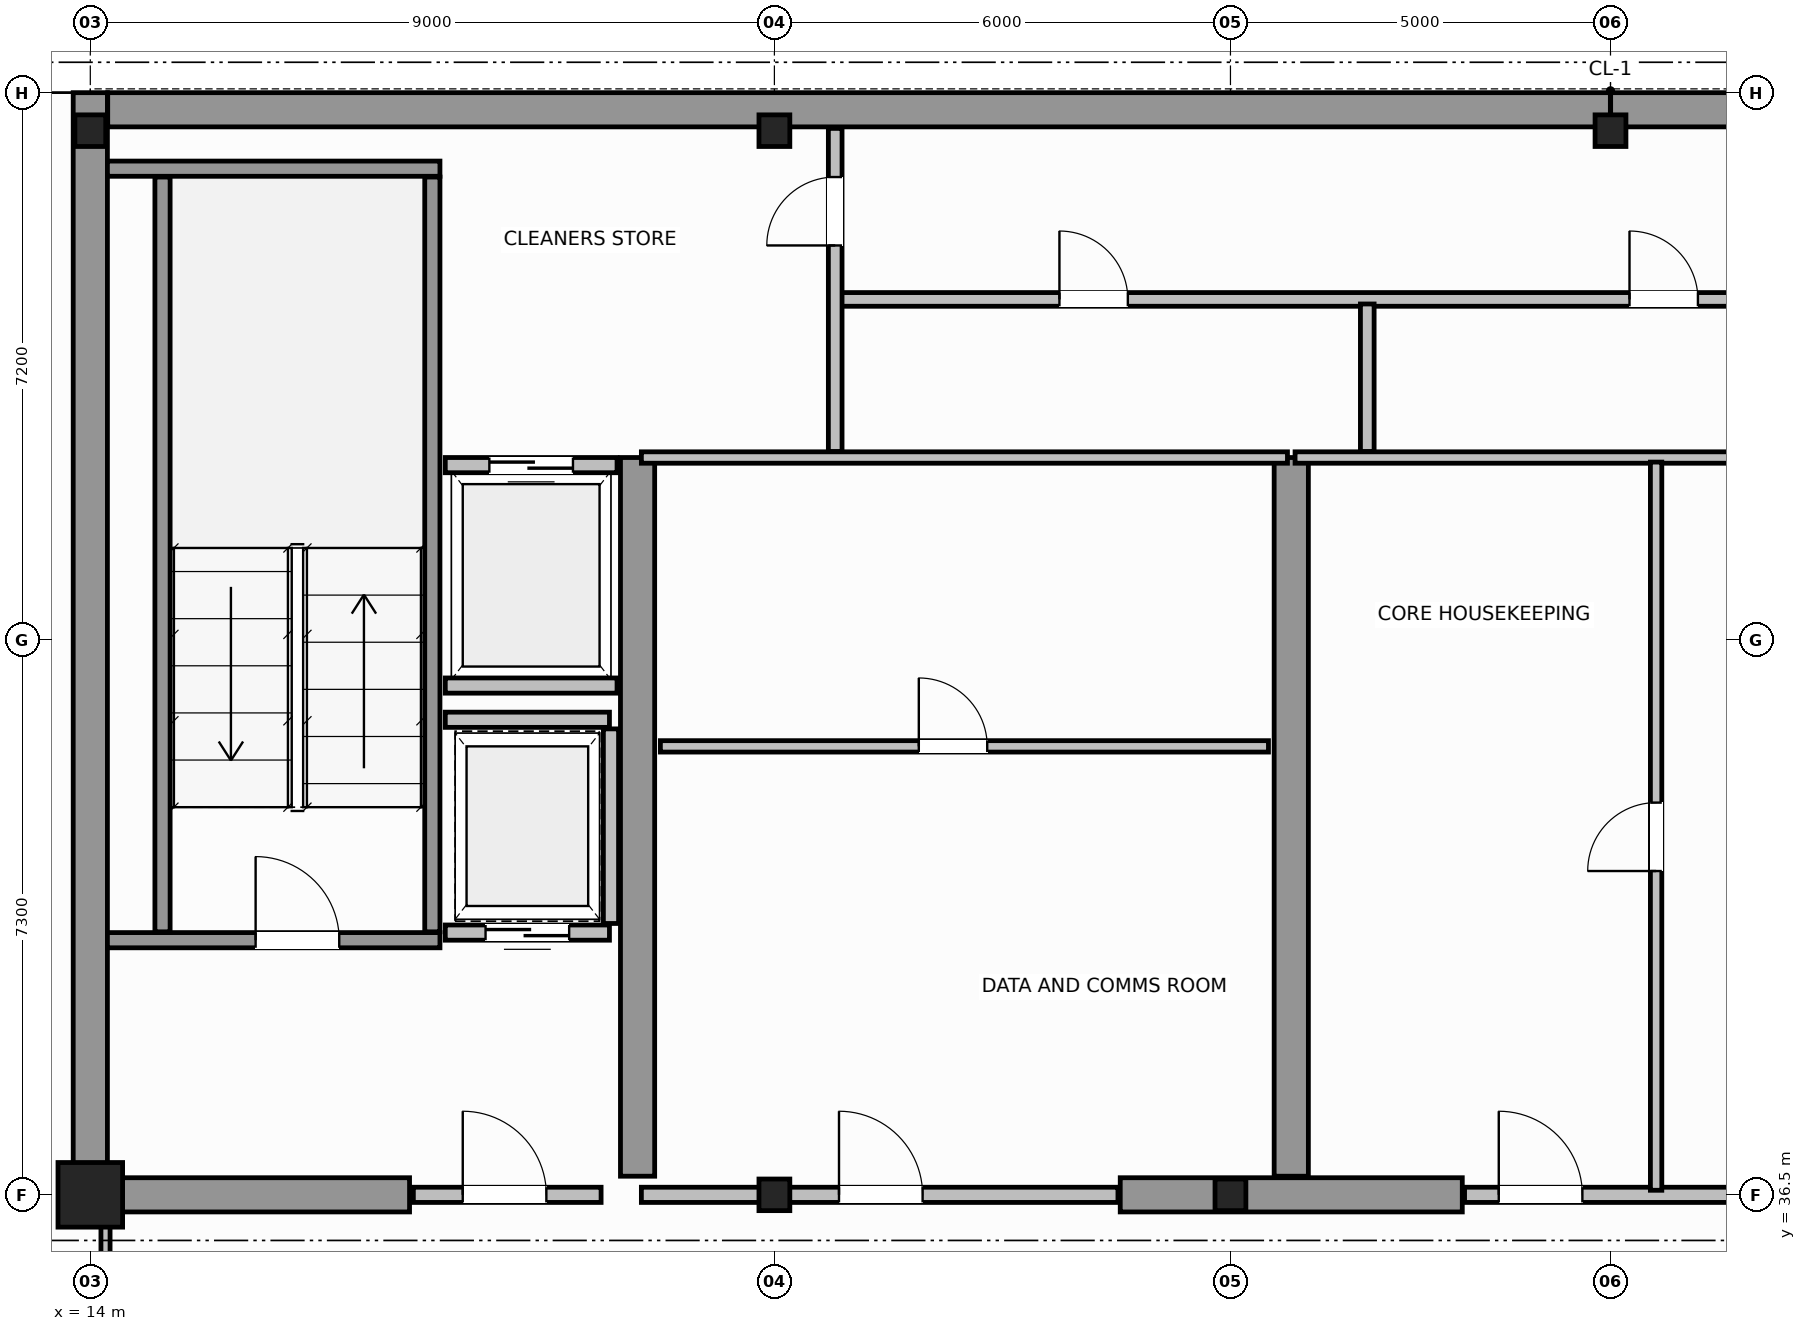
"""IFC4 building model, lengths in metres.
Left out: names, types, materials, properties, quantities, classifications, styles, units other than length and angle.
Written with IfcOpenShell. Run it as: python <this file> out.ifc"""

import sys

from ifc_helpers import new_model, si_unit, direction, frame, frame_2d, origin, origin_2d, place, context, subcontext, project, spatial, rectangle, i_section, extrude, source, transform, mapped, element, fill, save


model = new_model("IFC4")
c1 = context("Model", 3, precision=1e-05, world=origin(), true_north=direction((0.0, 1.0)))
c2 = subcontext(c1, "Body", "Model", "MODEL_VIEW")
j1 = project(units=[si_unit("LENGTHUNIT", "METRE"), si_unit("PLANEANGLEUNIT", "RADIAN")], contexts=[c1])
p1 = place(None, origin())
s1 = spatial("IfcSite", under=j1, at=p1, CompositionType="ELEMENT")
p2 = place(p1, origin())
s2 = spatial("IfcBuilding", under=s1, at=p2, CompositionType="ELEMENT")
p3 = place(p2, frame((0.0, 0.0, 276.4)))
s3 = spatial("IfcBuildingStorey", under=s2, at=p3, CompositionType="ELEMENT", Elevation=276.4)
m1 = source(origin(), c2, "Body", "SweptSolid", [
    extrude(rectangle(XDim=0.85, YDim=0.85, at=origin_2d()), origin(), (0.0, 0.0, 1.0), 3.8),
])
p4 = place(p3, frame((14.0, 36.5, 0.0), z_axis=(0.0, 0.0, 1.0), x_axis=(1.0, 0.0, 0.0)))
e1 = element("IfcColumn", 1, at=p4, inside=s3, PredefinedType="COLUMN", context=c2, shape_type="MappedRepresentation", body=[
    mapped(m1, transform((0.0, 0.0, 0.0), scale=1.0)),
])
m2 = source(origin(), c2, "Body", "SweptSolid", [
    extrude(i_section(OverallWidth=0.406, OverallDepth=0.416, WebThickness=0.03, FlangeThickness=0.042, FilletRadius=0.015, at=origin_2d()), origin(), (0.0, 0.0, 1.0), 3.8),
])
for number, where, z_axis, x_axis in (
    (2, (23.0, 36.5, 0.0), (0.0, 0.0, 1.0), (1.0, 0.0, 0.0)),
    (3, (29.0, 36.5, 0.0), (0.0, 0.0, 1.0), (1.0, 0.0, 0.0)),
    (4, (14.0, 50.5, 0.0), (0.0, 0.0, 1.0), (1.0, 0.0, 0.0)),
    (5, (23.0, 50.5, 0.0), (0.0, 0.0, 1.0), (1.0, 0.0, 0.0)),
    (6, (34.0, 50.5, 0.0), (0.0, 0.0, 1.0), (1.0, 0.0, 0.0)),
):
    element("IfcColumn", number, at=place(p3, frame(where, z_axis=z_axis, x_axis=x_axis)), inside=s3, PredefinedType="COLUMN", context=c2, shape_type="MappedRepresentation", body=[
        mapped(m2, transform((0.0, 0.0, 0.0), scale=1.0)),
    ])
for number, where, z_axis, x_axis in (
    (7, (14.229, 50.775, 0.0), (0.0, 0.0, 1.0), (1.0, 0.0, 0.0)),
    (8, (34.002, 50.775, 0.0), (0.0, 0.0, 1.0), (1.0, 0.0, 0.0)),
):
    element("IfcWall", number, at=place(p3, frame(where, z_axis=z_axis, x_axis=x_axis)), inside=s3, PredefinedType="SHEAR", context=c2, shape_type="SweptSolid", body=[
        extrude(rectangle(XDim=19.769, YDim=0.45, at=frame_2d((9.885, 0.0))), origin(), (0.0, 0.0, 1.0), 3.8),
    ])
p5 = place(p3, frame((14.0, 36.5, 0.0), z_axis=(0.0, 0.0, 1.0), x_axis=(0.0, 1.0, 0.0)))
e9 = element("IfcWall", 9, at=p5, inside=s3, PredefinedType="SHEAR", context=c2, shape_type="SweptSolid", body=[
    extrude(rectangle(XDim=14.5, YDim=0.45, at=frame_2d((7.25, 0.0))), origin(), (0.0, 0.0, 1.0), 3.8),
])
p6 = place(p3, frame((14.245, 36.5, 0.0), z_axis=(0.0, 0.0, 1.0), x_axis=(1.0, 0.0, 0.0)))
e10 = element("IfcWall", 10, at=p6, inside=s3, PredefinedType="SHEAR", context=c2, shape_type="SweptSolid", body=[
    extrude(rectangle(XDim=3.955, YDim=0.45, at=frame_2d((1.978, 0.0))), origin(), (0.0, 0.0, 1.0), 2.58),
])
p7 = place(p3, frame((27.55, 36.5, 0.0), z_axis=(0.0, 0.0, 1.0), x_axis=(1.0, 0.0, 0.0)))
e11 = element("IfcWall", 11, at=p7, inside=s3, PredefinedType="SHEAR", context=c2, shape_type="SweptSolid", body=[
    extrude(rectangle(XDim=4.5, YDim=0.45, at=frame_2d((2.25, 0.0))), origin(), (0.0, 0.0, 1.0), 3.8),
])
for number, where, z_axis, x_axis in (
    (12, (21.2, 36.745, 0.0), (0.0, 0.0, 1.0), (0.0, 1.0, 0.0)),
    (13, (29.8, 36.745, 0.0), (0.0, 0.0, 1.0), (0.0, 1.0, 0.0)),
):
    element("IfcWall", number, at=place(p3, frame(where, z_axis=z_axis, x_axis=x_axis)), inside=s3, PredefinedType="SHEAR", context=c2, shape_type="SweptSolid", body=[
        extrude(rectangle(XDim=9.455, YDim=0.45, at=frame_2d((4.728, 0.0))), origin(), (0.0, 0.0, 1.0), 3.8),
    ])
p8 = place(p3, frame((14.225, 39.85, 0.0), z_axis=(0.0, 0.0, 1.0), x_axis=(1.0, 0.0, 0.0)))
e14 = element("IfcWall", 14, at=p8, inside=s3, PredefinedType="SOLIDWALL", context=c2, shape_type="SweptSolid", body=[
    extrude(rectangle(XDim=4.375, YDim=0.2, at=frame_2d((2.188, 0.0))), origin(), (0.0, 0.0, 1.0), 3.8),
])
p9 = place(p8, frame((1.95, 0.0, 0.0)))
e15 = element("IfcOpeningElement", 15, at=p9, cuts=e14, PredefinedType="OPENING", context=c2, shape_type="SweptSolid", body=[
    extrude(rectangle(XDim=1.1, YDim=2.15, at=frame_2d((0.55, 1.075))), frame((0.0, 0.11, 0.0), z_axis=(0.0, -1.0, 0.0), x_axis=(1.0, 0.0, 0.0)), (0.0, 0.0, 1.0), 0.22),
])
p10 = place(p3, frame((14.225, 50.0, 0.0), z_axis=(0.0, 0.0, 1.0), x_axis=(1.0, 0.0, 0.0)))
e16 = element("IfcWall", 16, at=p10, inside=s3, PredefinedType="SOLIDWALL", context=c2, shape_type="SweptSolid", body=[
    extrude(rectangle(XDim=4.375, YDim=0.2, at=frame_2d((2.188, 0.0))), origin(), (0.0, 0.0, 1.0), 3.8),
])
for number, where, z_axis, x_axis in (
    (17, (14.95, 39.96, 0.0), (0.0, 0.0, 1.0), (0.0, 1.0, 0.0)),
    (18, (18.5, 39.96, 0.0), (0.0, 0.0, 1.0), (0.0, 1.0, 0.0)),
):
    element("IfcWall", number, at=place(p3, frame(where, z_axis=z_axis, x_axis=x_axis)), inside=s3, PredefinedType="SOLIDWALL", context=c2, shape_type="SweptSolid", body=[
        extrude(rectangle(XDim=9.93, YDim=0.2, at=frame_2d((4.965, 0.0))), origin(), (0.0, 0.0, 1.0), 3.8),
    ])
p11 = place(p3, frame((18.25, 36.5, 0.0), z_axis=(0.0, 0.0, 1.0), x_axis=(1.0, 0.0, 0.0)))
e19 = element("IfcWall", 19, at=p11, inside=s3, PredefinedType="SOLIDWALL", context=c2, shape_type="SweptSolid", body=[
    extrude(rectangle(XDim=2.47, YDim=0.2, at=frame_2d((1.235, 0.0))), origin(), (0.0, 0.0, 1.0), 2.57),
])
p12 = place(p11, frame((0.65, 0.0, 0.0)))
e20 = element("IfcOpeningElement", 20, at=p12, cuts=e19, PredefinedType="OPENING", context=c2, shape_type="SweptSolid", body=[
    extrude(rectangle(XDim=1.1, YDim=2.15, at=frame_2d((0.55, 1.075))), frame((0.0, 0.11, 0.0), z_axis=(0.0, -1.0, 0.0), x_axis=(1.0, 0.0, 0.0)), (0.0, 0.0, 1.0), 0.22),
])
p13 = place(p3, frame((18.67, 46.1, 0.0), z_axis=(0.0, 0.0, 1.0), x_axis=(1.0, 0.0, 0.0)))
e21 = element("IfcWall", 21, at=p13, inside=s3, PredefinedType="SOLIDWALL", context=c2, shape_type="SweptSolid", body=[
    extrude(rectangle(XDim=2.26, YDim=0.2, at=frame_2d((1.13, 0.0))), origin(), (0.0, 0.0, 1.0), 3.58),
])
p14 = place(p13, frame((0.58, 0.0, 0.0)))
e22 = element("IfcOpeningElement", 22, at=p14, cuts=e21, PredefinedType="OPENING", context=c2, shape_type="SweptSolid", body=[
    extrude(rectangle(XDim=1.1, YDim=2.15, at=frame_2d((0.55, 1.075))), frame((0.0, 0.11, 0.0), z_axis=(0.0, -1.0, 0.0), x_axis=(1.0, 0.0, 0.0)), (0.0, 0.0, 1.0), 0.22),
])
p15 = place(p3, frame((18.67, 43.2, 0.0), z_axis=(0.0, 0.0, 1.0), x_axis=(1.0, 0.0, 0.0)))
e23 = element("IfcWall", 23, at=p15, inside=s3, PredefinedType="SOLIDWALL", context=c2, shape_type="SweptSolid", body=[
    extrude(rectangle(XDim=2.26, YDim=0.2, at=frame_2d((1.13, 0.0))), origin(), (0.0, 0.0, 1.0), 3.58),
])
p16 = place(p3, frame((18.67, 39.95, 0.0), z_axis=(0.0, 0.0, 1.0), x_axis=(1.0, 0.0, 0.0)))
e24 = element("IfcWall", 24, at=p16, inside=s3, PredefinedType="SOLIDWALL", context=c2, shape_type="SweptSolid", body=[
    extrude(rectangle(XDim=2.16, YDim=0.2, at=frame_2d((1.08, 0.0))), origin(), (0.0, 0.0, 1.0), 3.58),
])
p17 = place(p16, frame((0.53, 0.0, 0.0)))
e25 = element("IfcOpeningElement", 25, at=p17, cuts=e24, PredefinedType="OPENING", context=c2, shape_type="SweptSolid", body=[
    extrude(rectangle(XDim=1.1, YDim=2.15, at=frame_2d((0.55, 1.075))), frame((0.0, 0.11, 0.0), z_axis=(0.0, -1.0, 0.0), x_axis=(1.0, 0.0, 0.0)), (0.0, 0.0, 1.0), 0.22),
])
p18 = place(p3, frame((18.67, 42.75, 0.0), z_axis=(0.0, 0.0, 1.0), x_axis=(1.0, 0.0, 0.0)))
e26 = element("IfcWall", 26, at=p18, inside=s3, PredefinedType="SOLIDWALL", context=c2, shape_type="SweptSolid", body=[
    extrude(rectangle(XDim=2.16, YDim=0.2, at=frame_2d((1.08, 0.0))), origin(), (0.0, 0.0, 1.0), 3.58),
])
p19 = place(p3, frame((20.85, 40.07, 0.0), z_axis=(0.0, 0.0, 1.0), x_axis=(0.0, 1.0, 0.0)))
e27 = element("IfcWall", 27, at=p19, inside=s3, PredefinedType="SOLIDWALL", context=c2, shape_type="SweptSolid", body=[
    extrude(rectangle(XDim=2.56, YDim=0.2, at=frame_2d((1.28, 0.0))), origin(), (0.0, 0.0, 1.0), 3.58),
])
p20 = place(p3, frame((21.25, 36.5, 0.0), z_axis=(0.0, 0.0, 1.0), x_axis=(1.0, 0.0, 0.0)))
e28 = element("IfcWall", 28, at=p20, inside=s3, PredefinedType="SOLIDWALL", context=c2, shape_type="SweptSolid", body=[
    extrude(rectangle(XDim=6.27, YDim=0.2, at=frame_2d((3.135, 0.0))), origin(), (0.0, 0.0, 1.0), 2.57),
])
p21 = place(p20, frame((2.6, 0.0, 0.0)))
e29 = element("IfcOpeningElement", 29, at=p21, cuts=e28, PredefinedType="OPENING", context=c2, shape_type="SweptSolid", body=[
    extrude(rectangle(XDim=1.1, YDim=2.15, at=frame_2d((0.55, 1.075))), frame((0.0, 0.11, 0.0), z_axis=(0.0, -1.0, 0.0), x_axis=(1.0, 0.0, 0.0)), (0.0, 0.0, 1.0), 0.22),
])
p22 = place(p3, frame((21.25, 46.2, 0.0), z_axis=(0.0, 0.0, 1.0), x_axis=(1.0, 0.0, 0.0)))
e30 = element("IfcWall", 30, at=p22, inside=s3, PredefinedType="PARTITIONING", context=c2, shape_type="SweptSolid", body=[
    extrude(rectangle(XDim=8.5, YDim=0.15, at=frame_2d((4.25, 0.0))), origin(), (0.0, 0.0, 1.0), 3.58),
])
p23 = place(p3, frame((21.5, 42.4, 0.0), z_axis=(0.0, 0.0, 1.0), x_axis=(1.0, 0.0, 0.0)))
e31 = element("IfcWall", 31, at=p23, inside=s3, PredefinedType="PARTITIONING", context=c2, shape_type="SweptSolid", body=[
    extrude(rectangle(XDim=8.0, YDim=0.15, at=frame_2d((4.0, 0.0))), origin(), (0.0, 0.0, 1.0), 3.58),
])
p24 = place(p23, frame((3.4, 0.0, 0.0)))
e32 = element("IfcOpeningElement", 32, at=p24, cuts=e31, PredefinedType="OPENING", context=c2, shape_type="SweptSolid", body=[
    extrude(rectangle(XDim=0.9, YDim=2.1, at=frame_2d((0.45, 1.05))), frame((0.0, 0.085, 0.0), z_axis=(0.0, -1.0, 0.0), x_axis=(1.0, 0.0, 0.0)), (0.0, 0.0, 1.0), 0.17),
])
p25 = place(p3, frame((32.08, 36.5, 0.0), z_axis=(0.0, 0.0, 1.0), x_axis=(1.0, 0.0, 0.0)))
e33 = element("IfcWall", 33, at=p25, inside=s3, PredefinedType="SOLIDWALL", context=c2, shape_type="SweptSolid", body=[
    extrude(rectangle(XDim=4.04, YDim=0.2, at=frame_2d((2.02, 0.0))), origin(), (0.0, 0.0, 1.0), 3.02),
])
p26 = place(p25, frame((0.45, 0.0, 0.0)))
e34 = element("IfcOpeningElement", 34, at=p26, cuts=e33, PredefinedType="OPENING", context=c2, shape_type="SweptSolid", body=[
    extrude(rectangle(XDim=1.1, YDim=2.15, at=frame_2d((0.55, 1.075))), frame((0.0, 0.11, 0.0), z_axis=(0.0, -1.0, 0.0), x_axis=(1.0, 0.0, 0.0)), (0.0, 0.0, 1.0), 0.22),
])
p27 = place(p3, frame((29.85, 46.2, 0.0), z_axis=(0.0, 0.0, 1.0), x_axis=(1.0, 0.0, 0.0)))
e35 = element("IfcWall", 35, at=p27, inside=s3, PredefinedType="PARTITIONING", context=c2, shape_type="SweptSolid", body=[
    extrude(rectangle(XDim=8.5, YDim=0.15, at=frame_2d((4.25, 0.0))), origin(), (0.0, 0.0, 1.0), 3.58),
])
p28 = place(p3, frame((34.6, 36.56, 0.0), z_axis=(0.0, 0.0, 1.0), x_axis=(0.0, 1.0, 0.0)))
e36 = element("IfcWall", 36, at=p28, inside=s3, PredefinedType="PARTITIONING", context=c2, shape_type="SweptSolid", body=[
    extrude(rectangle(XDim=9.58, YDim=0.15, at=frame_2d((4.79, 0.0))), origin(), (0.0, 0.0, 1.0), 3.58),
])
p29 = place(p28, frame((4.2, 0.0, 0.0)))
e37 = element("IfcOpeningElement", 37, at=p29, cuts=e36, PredefinedType="OPENING", context=c2, shape_type="SweptSolid", body=[
    extrude(rectangle(XDim=0.9, YDim=2.1, at=frame_2d((0.45, 1.05))), frame((0.0, 0.085, 0.0), z_axis=(0.0, -1.0, 0.0), x_axis=(1.0, 0.0, 0.0)), (0.0, 0.0, 1.0), 0.17),
])
p30 = place(p3, frame((23.85, 48.28, 0.0), z_axis=(0.0, 0.0, 1.0), x_axis=(1.0, 0.0, 0.0)))
e38 = element("IfcWall", 38, at=p30, inside=s3, PredefinedType="PLUMBINGWALL", context=c2, shape_type="SweptSolid", body=[
    extrude(rectangle(XDim=15.03, YDim=0.18, at=frame_2d((7.515, 0.0))), origin(), (0.0, 0.0, 1.0), 3.58),
])
p31 = place(p30, frame((2.9, 0.0, 0.0)))
e39 = element("IfcOpeningElement", 39, at=p31, cuts=e38, PredefinedType="OPENING", context=c2, shape_type="SweptSolid", body=[
    extrude(rectangle(XDim=0.9, YDim=2.15, at=frame_2d((0.45, 1.075))), frame((0.0, 0.1, 0.0), z_axis=(0.0, -1.0, 0.0), x_axis=(1.0, 0.0, 0.0)), (0.0, 0.0, 1.0), 0.2),
])
p32 = place(p30, frame((10.4, 0.0, 0.0)))
e40 = element("IfcOpeningElement", 40, at=p32, cuts=e38, PredefinedType="OPENING", context=c2, shape_type="SweptSolid", body=[
    extrude(rectangle(XDim=0.9, YDim=2.15, at=frame_2d((0.45, 1.075))), frame((0.0, 0.1, 0.0), z_axis=(0.0, -1.0, 0.0), x_axis=(1.0, 0.0, 0.0)), (0.0, 0.0, 1.0), 0.2),
])
p33 = place(p3, frame((23.8, 46.28, 0.0), z_axis=(0.0, 0.0, 1.0), x_axis=(0.0, 1.0, 0.0)))
e41 = element("IfcWall", 41, at=p33, inside=s3, PredefinedType="PLUMBINGWALL", context=c2, shape_type="SweptSolid", body=[
    extrude(rectangle(XDim=4.25, YDim=0.18, at=frame_2d((2.125, 0.0))), origin(), (0.0, 0.0, 1.0), 3.58),
])
p34 = place(p33, frame((2.71, 0.0, 0.0)))
e42 = element("IfcOpeningElement", 42, at=p34, cuts=e41, PredefinedType="OPENING", context=c2, shape_type="SweptSolid", body=[
    extrude(rectangle(XDim=0.9, YDim=2.15, at=frame_2d((0.45, 1.075))), frame((0.0, 0.1, 0.0), z_axis=(0.0, -1.0, 0.0), x_axis=(1.0, 0.0, 0.0)), (0.0, 0.0, 1.0), 0.2),
])
p35 = place(p3, frame((30.8, 46.28, 0.0), z_axis=(0.0, 0.0, 1.0), x_axis=(0.0, 1.0, 0.0)))
e43 = element("IfcWall", 43, at=p35, inside=s3, PredefinedType="PLUMBINGWALL", context=c2, shape_type="SweptSolid", body=[
    extrude(rectangle(XDim=1.94, YDim=0.18, at=frame_2d((0.97, 0.0))), origin(), (0.0, 0.0, 1.0), 3.58),
])
p36 = place(p3, frame((14.2, 34.0, 0.0), z_axis=(0.0, 0.0, 1.0), x_axis=(0.0, 1.0, 0.0)))
e44 = element("IfcWall", 44, at=p36, inside=s3, PredefinedType="PARTITIONING", context=c2, shape_type="SweptSolid", body=[
    extrude(rectangle(XDim=2.44, YDim=0.12, at=frame_2d((1.22, 0.0))), origin(), (0.0, 0.0, 1.0), 3.58),
])
p37 = place(p36, frame((0.7, 0.0, 0.0)))
e45 = element("IfcOpeningElement", 45, at=p37, cuts=e44, PredefinedType="OPENING", context=c2, shape_type="SweptSolid", body=[
    extrude(rectangle(XDim=0.9, YDim=2.15, at=frame_2d((0.45, 1.075))), frame((0.0, 0.07, 0.0), z_axis=(0.0, -1.0, 0.0), x_axis=(1.0, 0.0, 0.0)), (0.0, 0.0, 1.0), 0.14),
])
m3 = source(origin(), c2, "Body", "SweptSolid", [
    extrude(rectangle(XDim=1.1, YDim=2.15, at=frame_2d((0.55, 1.075))), frame((0.0, 0.025, 0.0), z_axis=(0.0, -1.0, 0.0), x_axis=(1.0, 0.0, 0.0)), (0.0, 0.0, 1.0), 0.05),
])
p38 = place(p9, origin())
e46 = element("IfcDoor", 46, at=p38, inside=s3, OperationType="SINGLE_SWING_LEFT", PredefinedType="DOOR", context=c2, shape_type="MappedRepresentation", body=[
    mapped(m3, transform((0.0, 0.0, 0.0), scale=1.0)),
])
fill(e15, e46)
p39 = place(p12, origin())
e47 = element("IfcDoor", 47, at=p39, inside=s3, OperationType="SINGLE_SWING_RIGHT", PredefinedType="DOOR", context=c2, shape_type="MappedRepresentation", body=[
    mapped(m3, transform((0.0, 0.0, 0.0), scale=1.0)),
])
fill(e20, e47)
p40 = place(p14, origin())
e48 = element("IfcDoor", 48, at=p40, inside=s3, OperationType="DOUBLE_DOOR_SLIDING", PredefinedType="DOOR", context=c2, shape_type="MappedRepresentation", body=[
    mapped(m3, transform((0.0, 0.0, 0.0), scale=1.0)),
])
fill(e22, e48)
p41 = place(p17, origin())
e49 = element("IfcDoor", 49, at=p41, inside=s3, OperationType="DOUBLE_DOOR_SLIDING", PredefinedType="DOOR", context=c2, shape_type="MappedRepresentation", body=[
    mapped(m3, transform((0.0, 0.0, 0.0), scale=1.0)),
])
fill(e25, e49)
p42 = place(p21, origin())
e50 = element("IfcDoor", 50, at=p42, inside=s3, OperationType="SINGLE_SWING_LEFT", PredefinedType="DOOR", context=c2, shape_type="MappedRepresentation", body=[
    mapped(m3, transform((0.0, 0.0, 0.0), scale=1.0)),
])
fill(e29, e50)
m4 = source(origin(), c2, "Body", "SweptSolid", [
    extrude(rectangle(XDim=0.9, YDim=2.1, at=frame_2d((0.45, 1.05))), frame((0.0, 0.025, 0.0), z_axis=(0.0, -1.0, 0.0), x_axis=(1.0, 0.0, 0.0)), (0.0, 0.0, 1.0), 0.05),
])
p43 = place(p24, origin())
e51 = element("IfcDoor", 51, at=p43, inside=s3, OperationType="SINGLE_SWING_RIGHT", PredefinedType="DOOR", context=c2, shape_type="MappedRepresentation", body=[
    mapped(m4, transform((0.0, 0.0, 0.0), scale=1.0)),
])
fill(e32, e51)
p44 = place(p26, origin())
e52 = element("IfcDoor", 52, at=p44, inside=s3, OperationType="SINGLE_SWING_LEFT", PredefinedType="DOOR", context=c2, shape_type="MappedRepresentation", body=[
    mapped(m3, transform((0.0, 0.0, 0.0), scale=1.0)),
])
fill(e34, e52)
p45 = place(p29, origin())
e53 = element("IfcDoor", 53, at=p45, inside=s3, OperationType="SINGLE_SWING_RIGHT", PredefinedType="DOOR", context=c2, shape_type="MappedRepresentation", body=[
    mapped(m4, transform((0.0, 0.0, 0.0), scale=1.0)),
])
fill(e37, e53)
m5 = source(origin(), c2, "Body", "SweptSolid", [
    extrude(rectangle(XDim=0.9, YDim=2.15, at=frame_2d((0.45, 1.075))), frame((0.0, 0.025, 0.0), z_axis=(0.0, -1.0, 0.0), x_axis=(1.0, 0.0, 0.0)), (0.0, 0.0, 1.0), 0.05),
])
p46 = place(p34, origin())
e54 = element("IfcDoor", 54, at=p46, inside=s3, OperationType="SINGLE_SWING_LEFT", PredefinedType="DOOR", context=c2, shape_type="MappedRepresentation", body=[
    mapped(m5, transform((0.0, 0.0, 0.0), scale=1.0)),
])
fill(e42, e54)
p47 = place(p31, origin())
e55 = element("IfcDoor", 55, at=p47, inside=s3, OperationType="SINGLE_SWING_RIGHT", PredefinedType="DOOR", context=c2, shape_type="MappedRepresentation", body=[
    mapped(m5, transform((0.0, 0.0, 0.0), scale=1.0)),
])
fill(e39, e55)
p48 = place(p32, origin())
e56 = element("IfcDoor", 56, at=p48, inside=s3, OperationType="SINGLE_SWING_LEFT", PredefinedType="DOOR", context=c2, shape_type="MappedRepresentation", body=[
    mapped(m5, transform((0.0, 0.0, 0.0), scale=1.0)),
])
fill(e40, e56)
save(model, sys.argv[1])
